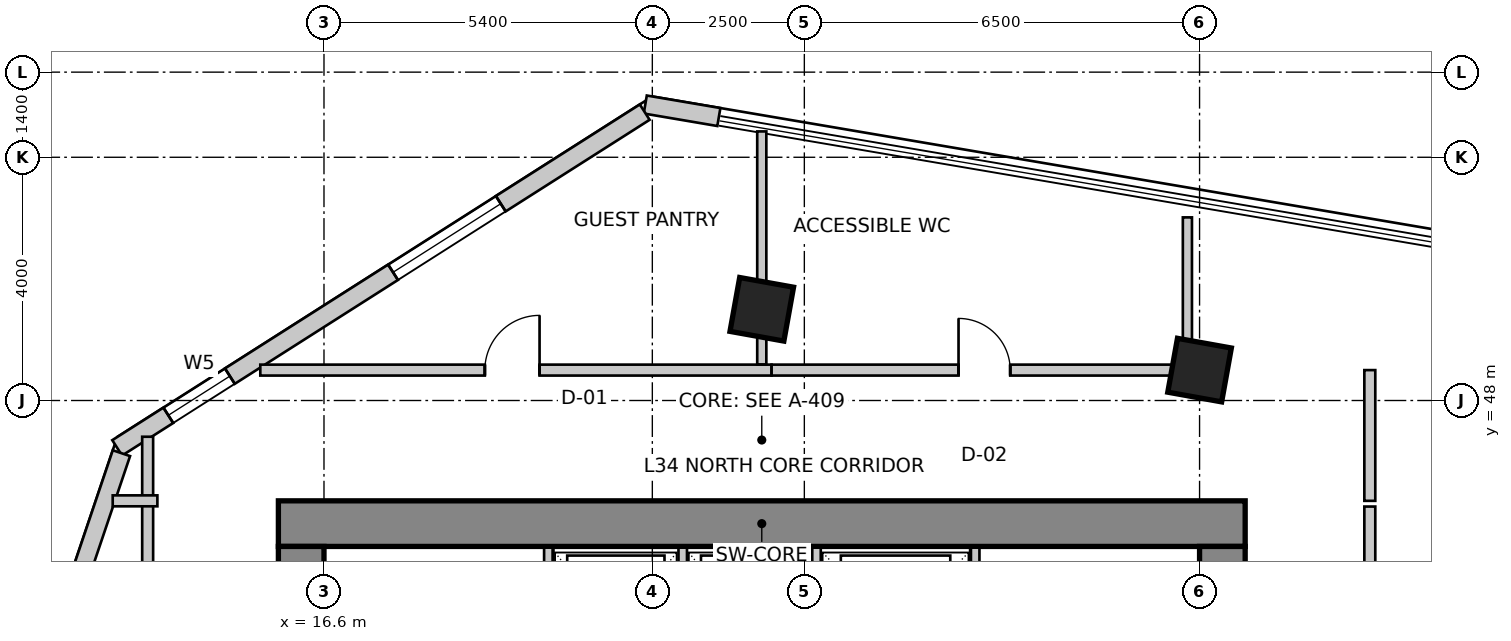
"""IFC4 building model, lengths in metres.
Left out: names, types, materials, properties, quantities, classifications, styles, units other than length and angle.
Written with IfcOpenShell. Run it as: python <this file> out.ifc"""

import sys

from ifc_helpers import new_model, si_unit, direction, frame, frame_2d, origin, origin_2d, place, context, subcontext, project, spatial, rectangle, extrude, source, transform, mapped, element, fill, save


model = new_model("IFC4")
c1 = context("Model", 3, precision=1e-05, world=origin(), true_north=direction((0.0, 1.0)))
c2 = subcontext(c1, "Body", "Model", "MODEL_VIEW")
j1 = project(units=[si_unit("LENGTHUNIT", "METRE"), si_unit("PLANEANGLEUNIT", "RADIAN")], contexts=[c1])
p1 = place(None, origin())
s1 = spatial("IfcSite", under=j1, at=p1, CompositionType="ELEMENT")
p2 = place(p1, origin())
s2 = spatial("IfcBuilding", under=s1, at=p2, CompositionType="ELEMENT")
p3 = place(p2, frame((0.0, 0.0, 139.4)))
s3 = spatial("IfcBuildingStorey", under=s2, at=p3, CompositionType="ELEMENT", Elevation=139.4)
p4 = place(p3, frame((15.85, 45.975, 0.0), z_axis=(0.0, 0.0, 1.0), x_axis=(1.0, 0.0, 0.0)))
e1 = element("IfcWall", 1, at=p4, inside=s3, PredefinedType="SHEAR", context=c2, shape_type="SweptSolid", body=[
    extrude(rectangle(XDim=15.9, YDim=0.75, at=frame_2d((7.95, 0.0))), origin(), (0.0, 0.0, 1.0), 3.6),
])
p5 = place(p3, frame((16.225, 34.2, 0.0), z_axis=(0.0, 0.0, 1.0), x_axis=(0.0, 1.0, 0.0)))
e2 = element("IfcWall", 2, at=p5, inside=s3, PredefinedType="SHEAR", context=c2, shape_type="SweptSolid", body=[
    extrude(rectangle(XDim=11.4, YDim=0.75, at=frame_2d((5.7, 0.0))), origin(), (0.0, 0.0, 1.0), 3.6),
])
m1 = source(origin(), c2, "Body", "SweptSolid", [
    extrude(rectangle(XDim=1.1, YDim=2.15, at=frame_2d((0.55, 1.075))), frame((0.0, 0.385, 0.0), z_axis=(0.0, -1.0, 0.0), x_axis=(1.0, 0.0, 0.0)), (0.0, 0.0, 1.0), 0.77),
])
p6 = place(p5, frame((7.15, 0.0, 0.0)))
e3 = element("IfcOpeningElement", 3, at=p6, cuts=e2, PredefinedType="OPENING", context=c2, shape_type="MappedRepresentation", body=[
    mapped(m1, transform((0.0, 0.0, 0.0), scale=1.0)),
])
p7 = place(p3, frame((31.375, 34.2, 0.0), z_axis=(0.0, 0.0, 1.0), x_axis=(0.0, 1.0, 0.0)))
e4 = element("IfcWall", 4, at=p7, inside=s3, PredefinedType="SHEAR", context=c2, shape_type="SweptSolid", body=[
    extrude(rectangle(XDim=11.4, YDim=0.75, at=frame_2d((5.7, 0.0))), origin(), (0.0, 0.0, 1.0), 3.6),
])
p8 = place(p7, frame((7.35, 0.0, 0.0)))
e5 = element("IfcOpeningElement", 5, at=p8, cuts=e4, PredefinedType="OPENING", context=c2, shape_type="MappedRepresentation", body=[
    mapped(m1, transform((0.0, 0.0, 0.0), scale=1.0)),
])
m2 = source(origin(), c2, "Body", "SweptSolid", [
    extrude(rectangle(XDim=0.9, YDim=0.9, at=origin_2d()), origin(), (0.0, 0.0, 1.0), 3.6),
])
for number, where, z_axis, x_axis in (
    (6, (23.8, 49.5, 0.0), (0.0, 0.0, 1.0), (0.984, -0.177, 0.0)),
    (7, (31.0, 48.5, 0.0), (0.0, 0.0, 1.0), (0.984, -0.177, 0.0)),
):
    element("IfcColumn", number, at=place(p3, frame(where, z_axis=z_axis, x_axis=x_axis)), inside=s3, PredefinedType="COLUMN", context=c2, shape_type="MappedRepresentation", body=[
        mapped(m2, transform((0.0, 0.0, 0.0), scale=1.0)),
    ])
p9 = place(p3, frame((23.094, 52.662, 0.0), z_axis=(0.0, 0.0, 1.0), x_axis=(-0.985845658291, 0.167655414553, 0.0)))
e8 = element("IfcWall", 8, at=p9, inside=s3, PredefinedType="SOLIDWALL", context=c2, shape_type="SweptSolid", body=[
    extrude(rectangle(XDim=1.228, YDim=0.3, at=frame_2d((0.614, 0.0))), origin(), (0.0, 0.0, 1.0), 3.35),
])
p10 = place(p3, frame((21.875, 52.742, 0.0), z_axis=(0.0, 0.0, 1.0), x_axis=(-0.843662465249, -0.536873956092, 0.0)))
e9 = element("IfcWall", 9, at=p10, inside=s3, PredefinedType="SOLIDWALL", context=c2, shape_type="SweptSolid", body=[
    extrude(rectangle(XDim=10.284, YDim=0.3, at=frame_2d((5.142, 0.0))), origin(), (0.0, 0.0, 1.0), 3.35),
])
m3 = source(origin(), c2, "Body", "SweptSolid", [
    extrude(rectangle(XDim=2.1, YDim=2.0, at=frame_2d((1.05, 1.0))), frame((0.0, 0.16, 0.0), z_axis=(0.0, -1.0, 0.0), x_axis=(1.0, 0.0, 0.0)), (0.0, 0.0, 1.0), 0.32),
])
p11 = place(p10, frame((2.806, 0.0, 0.85)))
e10 = element("IfcOpeningElement", 10, at=p11, cuts=e9, PredefinedType="OPENING", context=c2, shape_type="MappedRepresentation", body=[
    mapped(m3, transform((0.0, 0.0, 0.0), scale=1.0)),
])
m4 = source(origin(), c2, "Body", "SweptSolid", [
    extrude(rectangle(XDim=1.2, YDim=1.6, at=frame_2d((0.6, 0.8))), frame((0.0, 0.16, 0.0), z_axis=(0.0, -1.0, 0.0), x_axis=(1.0, 0.0, 0.0)), (0.0, 0.0, 1.0), 0.32),
])
p12 = place(p10, frame((8.087, 0.0, 0.85)))
e11 = element("IfcOpeningElement", 11, at=p12, cuts=e9, PredefinedType="OPENING", context=c2, shape_type="MappedRepresentation", body=[
    mapped(m4, transform((0.0, 0.0, 0.0), scale=1.0)),
])
p13 = place(p3, frame((13.269, 47.134, 0.0), z_axis=(0.0, 0.0, 1.0), x_axis=(-0.319929773322, -0.947441259468, 0.0)))
e12 = element("IfcWall", 12, at=p13, inside=s3, PredefinedType="SOLIDWALL", context=c2, shape_type="SweptSolid", body=[
    extrude(rectangle(XDim=16.134, YDim=0.3, at=frame_2d((8.067, 0.0))), origin(), (0.0, 0.0, 1.0), 3.35),
])
m5 = source(origin(), c2, "Body", "SweptSolid", [
    extrude(rectangle(XDim=2.4, YDim=2.2, at=frame_2d((1.2, 1.1))), frame((0.0, 0.16, 0.0), z_axis=(0.0, -1.0, 0.0), x_axis=(1.0, 0.0, 0.0)), (0.0, 0.0, 1.0), 0.32),
])
p14 = place(p13, frame((2.276, 0.0, 0.85)))
e13 = element("IfcOpeningElement", 13, at=p14, cuts=e12, PredefinedType="OPENING", context=c2, shape_type="MappedRepresentation", body=[
    mapped(m5, transform((0.0, 0.0, 0.0), scale=1.0)),
])
p15 = place(p13, frame((7.361, 0.0, 0.85)))
e14 = element("IfcOpeningElement", 14, at=p15, cuts=e12, PredefinedType="OPENING", context=c2, shape_type="MappedRepresentation", body=[
    mapped(m3, transform((0.0, 0.0, 0.0), scale=1.0)),
])
p16 = place(p13, frame((12.146, 0.0, 0.85)))
e15 = element("IfcOpeningElement", 15, at=p16, cuts=e12, PredefinedType="OPENING", context=c2, shape_type="MappedRepresentation", body=[
    mapped(m5, transform((0.0, 0.0, 0.0), scale=1.0)),
])
for number, where, z_axis, x_axis in (
    (16, (20.29, 43.28, 0.0), (0.0, 0.0, 1.0), (0.0, 1.0, 0.0)),
    (17, (27.31, 43.28, 0.0), (0.0, 0.0, 1.0), (0.0, 1.0, 0.0)),
):
    element("IfcWall", number, at=place(p3, frame(where, z_axis=z_axis, x_axis=x_axis)), inside=s3, PredefinedType="SOLIDWALL", context=c2, shape_type="SweptSolid", body=[
        extrude(rectangle(XDim=2.3, YDim=0.14, at=frame_2d((1.15, 0.0))), origin(), (0.0, 0.0, 1.0), 3.35),
    ])
for number, where, z_axis, x_axis in (
    (18, (22.5, 43.02, 0.0), (0.0, 0.0, 1.0), (0.0, 1.0, 0.0)),
    (19, (24.7, 43.02, 0.0), (0.0, 0.0, 1.0), (0.0, 1.0, 0.0)),
):
    element("IfcWall", number, at=place(p3, frame(where, z_axis=z_axis, x_axis=x_axis)), inside=s3, PredefinedType="SOLIDWALL", context=c2, shape_type="SweptSolid", body=[
        extrude(rectangle(XDim=2.56, YDim=0.14, at=frame_2d((1.28, 0.0))), origin(), (0.0, 0.0, 1.0), 3.35),
    ])
p17 = place(p3, frame((13.7, 33.544, 0.0), z_axis=(0.0, 0.0, 1.0), x_axis=(0.0, 1.0, 0.0)))
e20 = element("IfcWall", 20, at=p17, inside=s3, PredefinedType="PARTITIONING", context=c2, shape_type="SweptSolid", body=[
    extrude(rectangle(XDim=13.86, YDim=0.18, at=frame_2d((6.93, 0.0))), origin(), (0.0, 0.0, 1.0), 2.492),
])
m6 = source(origin(), c2, "Body", "SweptSolid", [
    extrude(rectangle(XDim=0.9, YDim=2.15, at=frame_2d((0.45, 1.075))), frame((0.0, 0.1, 0.0), z_axis=(0.0, -1.0, 0.0), x_axis=(1.0, 0.0, 0.0)), (0.0, 0.0, 1.0), 0.2),
])
p18 = place(p17, frame((4.253, 0.0, 0.0)))
e21 = element("IfcOpeningElement", 21, at=p18, cuts=e20, PredefinedType="OPENING", context=c2, shape_type="MappedRepresentation", body=[
    mapped(m6, transform((0.0, 0.0, 0.0), scale=1.0)),
])
p19 = place(p3, frame((13.86, 46.35, 0.0), z_axis=(0.0, 0.0, 1.0), x_axis=(-1.0, 0.0, 0.0)))
e22 = element("IfcWall", 22, at=p19, inside=s3, PredefinedType="PARTITIONING", context=c2, shape_type="SweptSolid", body=[
    extrude(rectangle(XDim=0.735, YDim=0.18, at=frame_2d((0.367, 0.0))), origin(), (0.0, 0.0, 1.0), 3.35),
])
p20 = place(p3, frame((15.552, 48.5, 0.0), z_axis=(0.0, 0.0, 1.0), x_axis=(1.0, 0.0, 0.0)))
e23 = element("IfcWall", 23, at=p20, inside=s3, PredefinedType="PARTITIONING", context=c2, shape_type="SweptSolid", body=[
    extrude(rectangle(XDim=8.407, YDim=0.18, at=frame_2d((4.204, 0.0))), origin(), (0.0, 0.0, 1.0), 3.019),
])
p21 = place(p20, frame((3.693, 0.0, 0.0)))
e24 = element("IfcOpeningElement", 24, at=p21, cuts=e23, PredefinedType="OPENING", context=c2, shape_type="MappedRepresentation", body=[
    mapped(m6, transform((0.0, 0.0, 0.0), scale=1.0)),
])
p22 = place(p3, frame((23.962, 48.5, 0.0), z_axis=(0.0, 0.0, 1.0), x_axis=(1.0, 0.0, 0.0)))
e25 = element("IfcWall", 25, at=p22, inside=s3, PredefinedType="PARTITIONING", context=c2, shape_type="SweptSolid", body=[
    extrude(rectangle(XDim=6.998, YDim=0.18, at=frame_2d((3.499, 0.0))), origin(), (0.0, 0.0, 1.0), 2.492),
])
m7 = source(origin(), c2, "Body", "SweptSolid", [
    extrude(rectangle(XDim=0.85, YDim=2.15, at=frame_2d((0.425, 1.075))), frame((0.0, 0.1, 0.0), z_axis=(0.0, -1.0, 0.0), x_axis=(1.0, 0.0, 0.0)), (0.0, 0.0, 1.0), 0.2),
])
p23 = place(p22, frame((3.074, 0.0, 0.0)))
e26 = element("IfcOpeningElement", 26, at=p23, cuts=e25, PredefinedType="OPENING", context=c2, shape_type="MappedRepresentation", body=[
    mapped(m7, transform((0.0, 0.0, 0.0), scale=1.0)),
])
p24 = place(p3, frame((33.8, 48.5, 0.0), z_axis=(0.0, 0.0, 1.0), x_axis=(0.0, -1.0, 0.0)))
e27 = element("IfcWall", 27, at=p24, inside=s3, PredefinedType="PARTITIONING", context=c2, shape_type="SweptSolid", body=[
    extrude(rectangle(XDim=2.15, YDim=0.18, at=frame_2d((1.075, 0.0))), origin(), (0.0, 0.0, 1.0), 2.492),
])
p25 = place(p3, frame((33.8, 46.256, 0.0), z_axis=(0.0, 0.0, 1.0), x_axis=(0.0, -1.0, 0.0)))
e28 = element("IfcWall", 28, at=p25, inside=s3, PredefinedType="PARTITIONING", context=c2, shape_type="SweptSolid", body=[
    extrude(rectangle(XDim=10.056, YDim=0.18, at=frame_2d((5.028, 0.0))), origin(), (0.0, 0.0, 1.0), 2.879),
])
m8 = source(origin(), c2, "Body", "SweptSolid", [
    extrude(rectangle(XDim=1.6, YDim=2.15, at=frame_2d((0.8, 1.075))), frame((0.0, 0.1, 0.0), z_axis=(0.0, -1.0, 0.0), x_axis=(1.0, 0.0, 0.0)), (0.0, 0.0, 1.0), 0.2),
])
p26 = place(p25, frame((4.167, 0.0, 0.0)))
e29 = element("IfcOpeningElement", 29, at=p26, cuts=e28, PredefinedType="OPENING", context=c2, shape_type="MappedRepresentation", body=[
    mapped(m8, transform((0.0, 0.0, 0.0), scale=1.0)),
])
p27 = place(p3, frame((23.8, 52.425, 0.0), z_axis=(0.0, 0.0, 1.0), x_axis=(0.0, -1.0, 0.0)))
e30 = element("IfcWall", 30, at=p27, inside=s3, PredefinedType="PARTITIONING", context=c2, shape_type="SweptSolid", body=[
    extrude(rectangle(XDim=3.831, YDim=0.15, at=frame_2d((1.916, 0.0))), origin(), (0.0, 0.0, 1.0), 2.492),
])
p28 = place(p3, frame((30.8, 51.011, 0.0), z_axis=(0.0, 0.0, 1.0), x_axis=(0.0, -1.0, 0.0)))
e31 = element("IfcWall", 31, at=p28, inside=s3, PredefinedType="PARTITIONING", context=c2, shape_type="SweptSolid", body=[
    extrude(rectangle(XDim=2.292, YDim=0.15, at=frame_2d((1.146, 0.0))), origin(), (0.0, 0.0, 1.0), 3.35),
])
m9 = source(origin(), c2, "Body", "SweptSolid", [
    extrude(rectangle(XDim=2.1, YDim=2.0, at=frame_2d((1.05, 1.0))), frame((0.0, -0.015, 0.0), z_axis=(0.0, -1.0, 0.0), x_axis=(1.0, 0.0, 0.0)), (0.0, 0.0, 1.0), 0.06),
])
p29 = place(p11, origin())
e32 = element("IfcWindow", 32, at=p29, inside=s3, PartitioningType="SINGLE_PANEL", PredefinedType="WINDOW", context=c2, shape_type="MappedRepresentation", body=[
    mapped(m9, transform((0.0, 0.0, 0.0), scale=1.0)),
])
fill(e10, e32)
m10 = source(origin(), c2, "Body", "SweptSolid", [
    extrude(rectangle(XDim=1.2, YDim=1.6, at=frame_2d((0.6, 0.8))), frame((0.0, -0.015, 0.0), z_axis=(0.0, -1.0, 0.0), x_axis=(1.0, 0.0, 0.0)), (0.0, 0.0, 1.0), 0.06),
])
p30 = place(p12, origin())
e33 = element("IfcWindow", 33, at=p30, inside=s3, PartitioningType="SINGLE_PANEL", PredefinedType="WINDOW", context=c2, shape_type="MappedRepresentation", body=[
    mapped(m10, transform((0.0, 0.0, 0.0), scale=1.0)),
])
fill(e11, e33)
m11 = source(origin(), c2, "Body", "SweptSolid", [
    extrude(rectangle(XDim=0.9, YDim=2.15, at=frame_2d((0.45, 1.075))), frame((0.0, 0.025, 0.0), z_axis=(0.0, -1.0, 0.0), x_axis=(1.0, 0.0, 0.0)), (0.0, 0.0, 1.0), 0.05),
])
p31 = place(p21, origin())
e34 = element("IfcDoor", 34, at=p31, inside=s3, OperationType="SINGLE_SWING_RIGHT", PredefinedType="DOOR", context=c2, shape_type="MappedRepresentation", body=[
    mapped(m11, transform((0.0, 0.0, 0.0), scale=1.0)),
])
fill(e24, e34)
m12 = source(origin(), c2, "Body", "SweptSolid", [
    extrude(rectangle(XDim=0.85, YDim=2.15, at=frame_2d((0.425, 1.075))), frame((0.0, 0.025, 0.0), z_axis=(0.0, -1.0, 0.0), x_axis=(1.0, 0.0, 0.0)), (0.0, 0.0, 1.0), 0.05),
])
p32 = place(p23, origin())
e35 = element("IfcDoor", 35, at=p32, inside=s3, OperationType="SINGLE_SWING_LEFT", PredefinedType="DOOR", context=c2, shape_type="MappedRepresentation", body=[
    mapped(m12, transform((0.0, 0.0, 0.0), scale=1.0)),
])
fill(e26, e35)
save(model, sys.argv[1])
